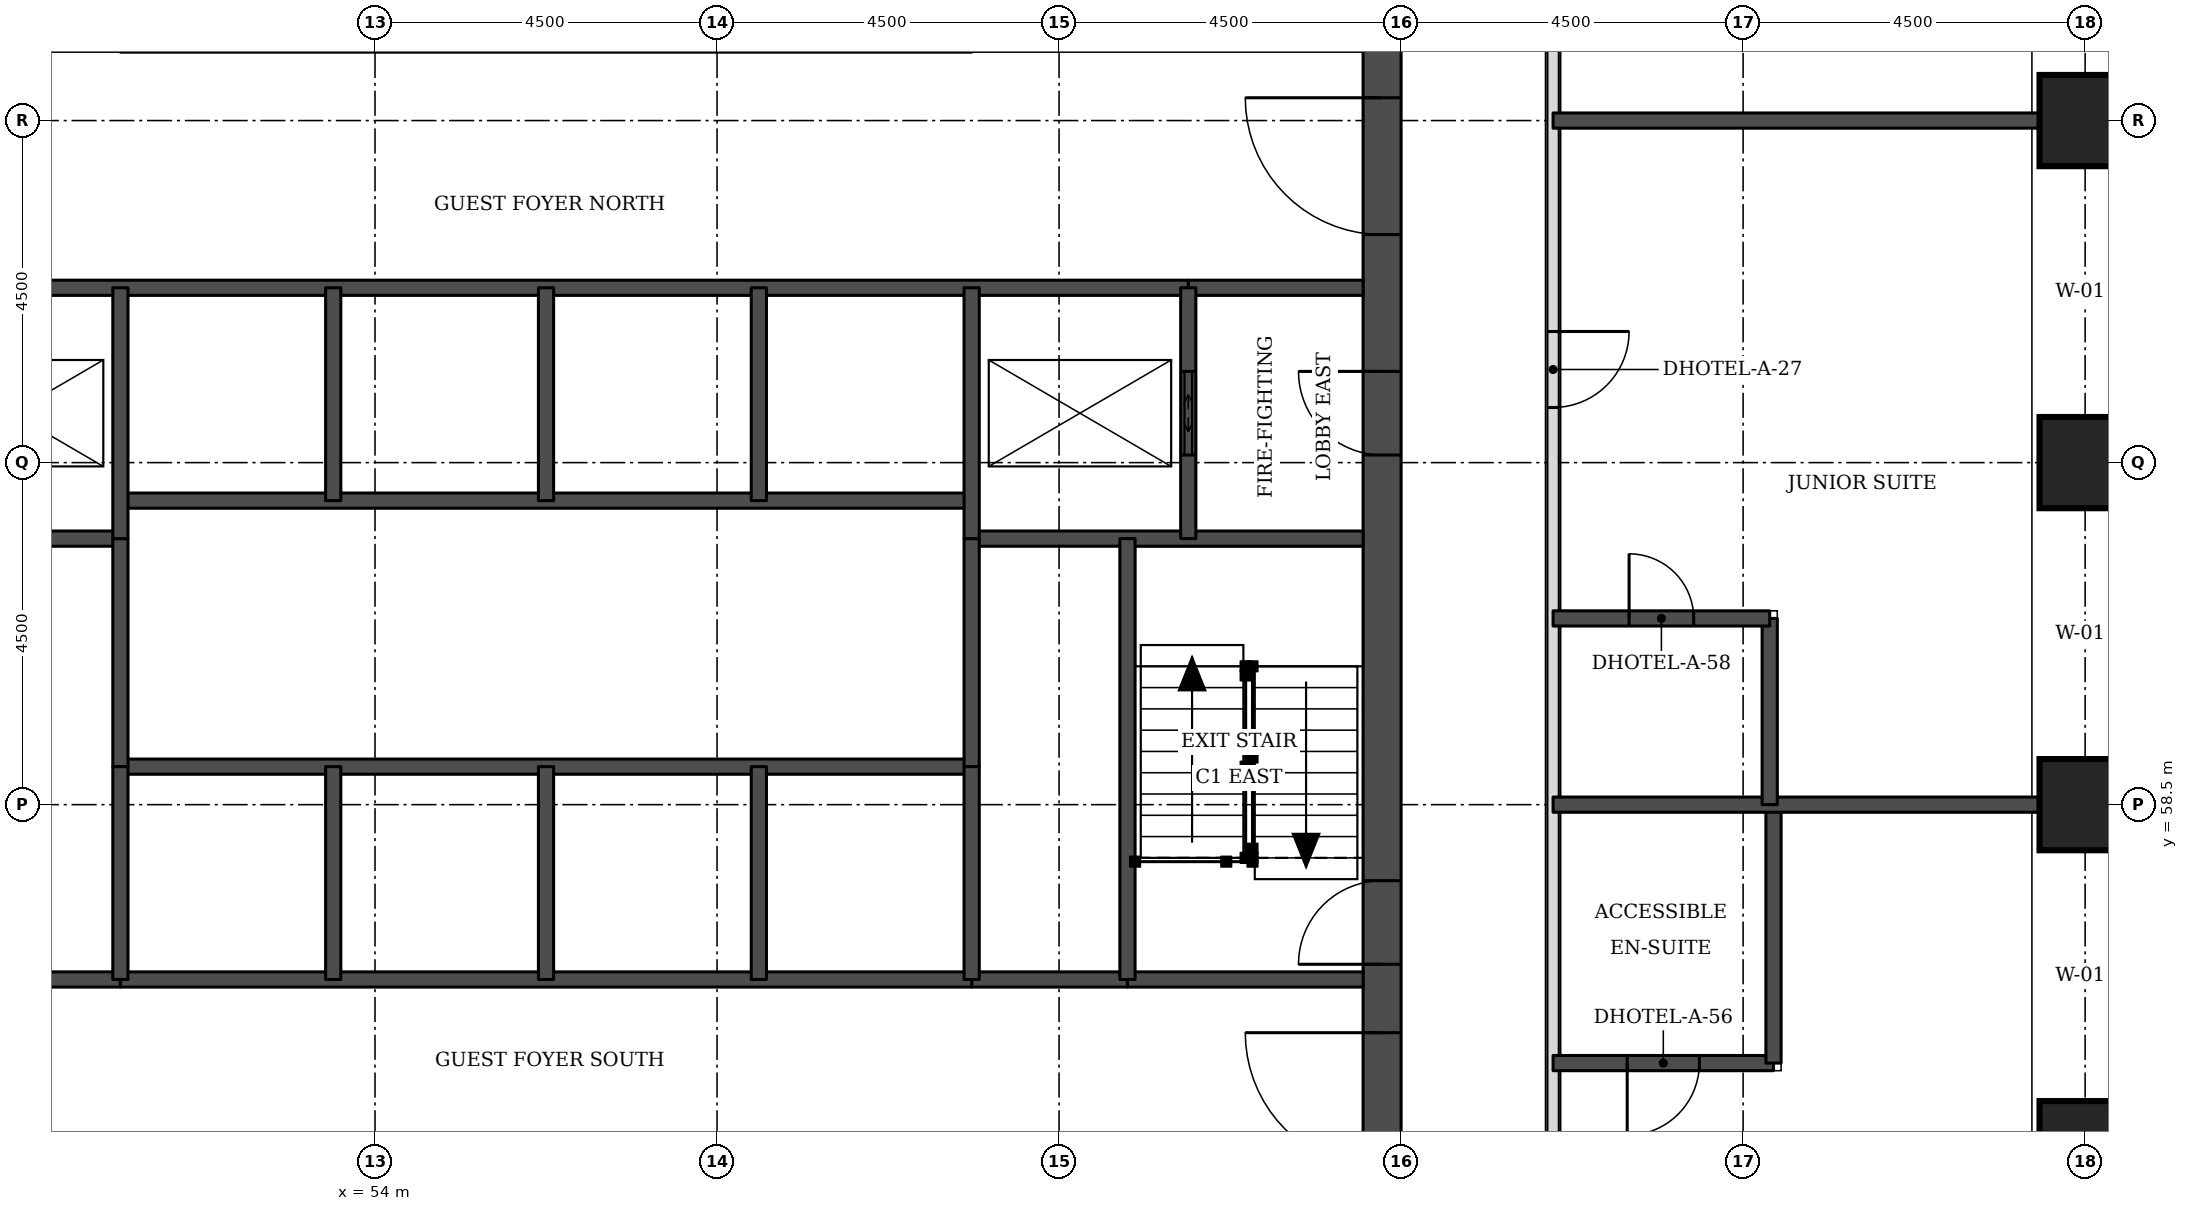
"""IFC4 building model, lengths in metres.
Left out: names, types, materials, properties, quantities, classifications, styles, units other than length and angle.
Written with IfcOpenShell. Run it as: python <this file> out.ifc"""

import sys

from ifc_helpers import new_model, si_unit, direction, frame, frame_2d, origin, origin_2d, place, context, subcontext, project, spatial, rectangle, extrude, element, fill, save


model = new_model("IFC4")
c1 = context("Model", 3, precision=1e-05, world=origin(), true_north=direction((0.0, 1.0)))
c2 = subcontext(c1, "Body", "Model", "MODEL_VIEW")
j1 = project(units=[si_unit("LENGTHUNIT", "METRE"), si_unit("PLANEANGLEUNIT", "RADIAN")], contexts=[c1])
p1 = place(None, origin())
s1 = spatial("IfcSite", under=j1, at=p1, CompositionType="ELEMENT")
p2 = place(p1, origin())
s2 = spatial("IfcBuilding", under=s1, at=p2, CompositionType="ELEMENT")
p3 = place(p2, frame((0.0, 0.0, 26.4)))
s3 = spatial("IfcBuildingStorey", under=s2, at=p3, CompositionType="ELEMENT", Elevation=26.4)
for number, where, z_axis, x_axis in (
    (1, (76.5, 54.0, 0.0), (0.0, 0.0, 1.0), (1.0, 0.0, 0.0)),
    (2, (76.5, 58.5, 0.0), (0.0, 0.0, 1.0), (1.0, 0.0, 0.0)),
    (3, (76.5, 63.0, 0.0), (0.0, 0.0, 1.0), (1.0, 0.0, 0.0)),
    (4, (76.5, 67.5, 0.0), (0.0, 0.0, 1.0), (1.0, 0.0, 0.0)),
):
    element("IfcColumn", number, at=place(p3, frame(where, z_axis=z_axis, x_axis=x_axis)), inside=s3, PredefinedType="COLUMN", context=c2, shape_type="SweptSolid", body=[
        extrude(rectangle(XDim=1.2, YDim=1.2, at=origin_2d()), origin(), (0.0, 0.0, 1.0), 3.3),
    ])
p4 = place(p3, frame((67.25, 49.5, 0.0), z_axis=(0.0, 0.0, 1.0), x_axis=(0.0, 1.0, 0.0)))
e5 = element("IfcWall", 5, at=p4, inside=s3, PredefinedType="SHEAR", context=c2, shape_type="SweptSolid", body=[
    extrude(rectangle(XDim=22.5, YDim=0.5, at=frame_2d((11.25, 0.0))), origin(), (0.0, 0.0, 1.0), 3.3),
])
p5 = place(p4, frame((4.2, 0.0, 0.0)))
e6 = element("IfcOpeningElement", 6, at=p5, cuts=e5, PredefinedType="OPENING", context=c2, shape_type="SweptSolid", body=[
    extrude(rectangle(XDim=1.8, YDim=2.1, at=frame_2d((0.9, 1.05))), frame((0.0, 0.26, 0.0), z_axis=(0.0, -1.0, 0.0), x_axis=(1.0, 0.0, 0.0)), (0.0, 0.0, 1.0), 0.52),
])
p6 = place(p4, frame((6.9, 0.0, 0.0)))
e7 = element("IfcOpeningElement", 7, at=p6, cuts=e5, PredefinedType="OPENING", context=c2, shape_type="SweptSolid", body=[
    extrude(rectangle(XDim=1.1, YDim=2.1, at=frame_2d((0.55, 1.05))), frame((0.0, 0.26, 0.0), z_axis=(0.0, -1.0, 0.0), x_axis=(1.0, 0.0, 0.0)), (0.0, 0.0, 1.0), 0.52),
])
p7 = place(p4, frame((13.6, 0.0, 0.0)))
e8 = element("IfcOpeningElement", 8, at=p7, cuts=e5, PredefinedType="OPENING", context=c2, shape_type="SweptSolid", body=[
    extrude(rectangle(XDim=1.1, YDim=2.1, at=frame_2d((0.55, 1.05))), frame((0.0, 0.26, 0.0), z_axis=(0.0, -1.0, 0.0), x_axis=(1.0, 0.0, 0.0)), (0.0, 0.0, 1.0), 0.52),
])
p8 = place(p4, frame((16.5, 0.0, 0.0)))
e9 = element("IfcOpeningElement", 9, at=p8, cuts=e5, PredefinedType="OPENING", context=c2, shape_type="SweptSolid", body=[
    extrude(rectangle(XDim=1.8, YDim=2.1, at=frame_2d((0.9, 1.05))), frame((0.0, 0.26, 0.0), z_axis=(0.0, -1.0, 0.0), x_axis=(1.0, 0.0, 0.0)), (0.0, 0.0, 1.0), 0.52),
])
p9 = place(p3, frame((69.5, 47.5, 0.0), z_axis=(0.0, 0.0, 1.0), x_axis=(0.0, 1.0, 0.0)))
e10 = element("IfcWall", 10, at=p9, inside=s3, PredefinedType="PARTITIONING", context=c2, shape_type="SweptSolid", body=[
    extrude(rectangle(XDim=26.5, YDim=0.15, at=frame_2d((13.25, 0.0))), origin(), (0.0, 0.0, 1.0), 3.08),
])
p10 = place(p9, frame((22.525, 0.0, 0.0)))
e11 = element("IfcOpeningElement", 11, at=p10, cuts=e10, PredefinedType="OPENING", context=c2, shape_type="SweptSolid", body=[
    extrude(rectangle(XDim=1.0, YDim=2.1, at=frame_2d((0.5, 1.05))), frame((0.0, 0.085, 0.0), z_axis=(0.0, -1.0, 0.0), x_axis=(1.0, 0.0, 0.0)), (0.0, 0.0, 1.0), 0.17),
])
p11 = place(p9, frame((16.225, 0.0, 0.0)))
e12 = element("IfcOpeningElement", 12, at=p11, cuts=e10, PredefinedType="OPENING", context=c2, shape_type="SweptSolid", body=[
    extrude(rectangle(XDim=1.0, YDim=2.1, at=frame_2d((0.5, 1.05))), frame((0.0, 0.085, 0.0), z_axis=(0.0, -1.0, 0.0), x_axis=(1.0, 0.0, 0.0)), (0.0, 0.0, 1.0), 0.17),
])
p12 = place(p9, frame((4.25, 0.0, 0.0)))
e13 = element("IfcOpeningElement", 13, at=p12, cuts=e10, PredefinedType="OPENING", context=c2, shape_type="SweptSolid", body=[
    extrude(rectangle(XDim=1.1, YDim=2.1, at=frame_2d((0.55, 1.05))), frame((0.0, 0.085, 0.0), z_axis=(0.0, -1.0, 0.0), x_axis=(1.0, 0.0, 0.0)), (0.0, 0.0, 1.0), 0.17),
])
p13 = place(p9, frame((0.447, 0.0, 0.0)))
e14 = element("IfcOpeningElement", 14, at=p13, cuts=e10, PredefinedType="OPENING", context=c2, shape_type="SweptSolid", body=[
    extrude(rectangle(XDim=1.0, YDim=2.1, at=frame_2d((0.5, 1.05))), frame((0.0, 0.085, 0.0), z_axis=(0.0, -1.0, 0.0), x_axis=(1.0, 0.0, 0.0)), (0.0, 0.0, 1.0), 0.17),
])
p14 = place(p3, frame((69.5, 55.1, 0.0), z_axis=(0.0, 0.0, 1.0), x_axis=(1.0, 0.0, 0.0)))
e15 = element("IfcWall", 15, at=p14, inside=s3, PredefinedType="SOLIDWALL", context=c2, shape_type="SweptSolid", body=[
    extrude(rectangle(XDim=2.9, YDim=0.2, at=frame_2d((1.45, 0.0))), origin(), (0.0, 0.0, 1.0), 3.08),
])
p15 = place(p14, frame((0.975, 0.0, 0.0)))
e16 = element("IfcOpeningElement", 16, at=p15, cuts=e15, PredefinedType="OPENING", context=c2, shape_type="SweptSolid", body=[
    extrude(rectangle(XDim=0.95, YDim=2.1, at=frame_2d((0.475, 1.05))), frame((0.0, 0.11, 0.0), z_axis=(0.0, -1.0, 0.0), x_axis=(1.0, 0.0, 0.0)), (0.0, 0.0, 1.0), 0.22),
])
p16 = place(p3, frame((72.4, 55.1, 0.0), z_axis=(0.0, 0.0, 1.0), x_axis=(0.0, 1.0, 0.0)))
e17 = element("IfcWall", 17, at=p16, inside=s3, PredefinedType="SOLIDWALL", context=c2, shape_type="SweptSolid", body=[
    extrude(rectangle(XDim=3.4, YDim=0.2, at=frame_2d((1.7, 0.0))), origin(), (0.0, 0.0, 1.0), 3.08),
])
p17 = place(p3, frame((69.5, 58.5, 0.0), z_axis=(0.0, 0.0, 1.0), x_axis=(1.0, 0.0, 0.0)))
e18 = element("IfcWall", 18, at=p17, inside=s3, PredefinedType="SOLIDWALL", context=c2, shape_type="SweptSolid", body=[
    extrude(rectangle(XDim=6.4, YDim=0.2, at=frame_2d((3.2, 0.0))), origin(), (0.0, 0.0, 1.0), 3.08),
])
p18 = place(p3, frame((72.35, 58.5, 0.0), z_axis=(0.0, 0.0, 1.0), x_axis=(0.0, 1.0, 0.0)))
e19 = element("IfcWall", 19, at=p18, inside=s3, PredefinedType="SOLIDWALL", context=c2, shape_type="SweptSolid", body=[
    extrude(rectangle(XDim=2.45, YDim=0.2, at=frame_2d((1.225, 0.0))), origin(), (0.0, 0.0, 1.0), 3.08),
])
p19 = place(p3, frame((69.5, 60.95, 0.0), z_axis=(0.0, 0.0, 1.0), x_axis=(1.0, 0.0, 0.0)))
e20 = element("IfcWall", 20, at=p19, inside=s3, PredefinedType="SOLIDWALL", context=c2, shape_type="SweptSolid", body=[
    extrude(rectangle(XDim=2.85, YDim=0.2, at=frame_2d((1.425, 0.0))), origin(), (0.0, 0.0, 1.0), 3.08),
])
p20 = place(p19, frame((1.0, 0.0, 0.0)))
e21 = element("IfcOpeningElement", 21, at=p20, cuts=e20, PredefinedType="OPENING", context=c2, shape_type="SweptSolid", body=[
    extrude(rectangle(XDim=0.85, YDim=2.1, at=frame_2d((0.425, 1.05))), frame((0.0, 0.11, 0.0), z_axis=(0.0, -1.0, 0.0), x_axis=(1.0, 0.0, 0.0)), (0.0, 0.0, 1.0), 0.22),
])
p21 = place(p3, frame((69.5, 67.5, 0.0), z_axis=(0.0, 0.0, 1.0), x_axis=(1.0, 0.0, 0.0)))
e22 = element("IfcWall", 22, at=p21, inside=s3, PredefinedType="SOLIDWALL", context=c2, shape_type="SweptSolid", body=[
    extrude(rectangle(XDim=6.4, YDim=0.2, at=frame_2d((3.2, 0.0))), origin(), (0.0, 0.0, 1.0), 3.08),
])
for number, where, z_axis, x_axis in (
    (23, (48.6, 56.2, 0.0), (0.0, 0.0, 1.0), (1.0, 0.0, 0.0)),
    (24, (61.85, 56.2, 0.0), (0.0, 0.0, 1.0), (1.0, 0.0, 0.0)),
):
    element("IfcWall", number, at=place(p3, frame(where, z_axis=z_axis, x_axis=x_axis)), inside=s3, PredefinedType="SOLIDWALL", context=c2, shape_type="SweptSolid", body=[
        extrude(rectangle(XDim=2.05, YDim=0.2, at=frame_2d((1.025, 0.0))), origin(), (0.0, 0.0, 1.0), 3.08),
    ])
p22 = place(p3, frame((50.65, 56.2, 0.0), z_axis=(0.0, 0.0, 1.0), x_axis=(1.0, 0.0, 0.0)))
e25 = element("IfcWall", 25, at=p22, inside=s3, PredefinedType="SOLIDWALL", context=c2, shape_type="SweptSolid", body=[
    extrude(rectangle(XDim=11.2, YDim=0.2, at=frame_2d((5.6, 0.0))), origin(), (0.0, 0.0, 1.0), 3.08),
])
p23 = place(p3, frame((63.9, 56.2, 0.0), z_axis=(0.0, 0.0, 1.0), x_axis=(1.0, 0.0, 0.0)))
e26 = element("IfcWall", 26, at=p23, inside=s3, PredefinedType="SOLIDWALL", context=c2, shape_type="SweptSolid", body=[
    extrude(rectangle(XDim=3.1, YDim=0.2, at=frame_2d((1.55, 0.0))), origin(), (0.0, 0.0, 1.0), 3.08),
])
p24 = place(p3, frame((50.65, 59.0, 0.0), z_axis=(0.0, 0.0, 1.0), x_axis=(1.0, 0.0, 0.0)))
e27 = element("IfcWall", 27, at=p24, inside=s3, PredefinedType="SOLIDWALL", context=c2, shape_type="SweptSolid", body=[
    extrude(rectangle(XDim=11.2, YDim=0.2, at=frame_2d((5.6, 0.0))), origin(), (0.0, 0.0, 1.0), 3.3),
])
for number, where, z_axis, x_axis in (
    (28, (45.5, 62.0, 0.0), (0.0, 0.0, 1.0), (1.0, 0.0, 0.0)),
    (29, (61.85, 62.0, 0.0), (0.0, 0.0, 1.0), (1.0, 0.0, 0.0)),
):
    element("IfcWall", number, at=place(p3, frame(where, z_axis=z_axis, x_axis=x_axis)), inside=s3, PredefinedType="SOLIDWALL", context=c2, shape_type="SweptSolid", body=[
        extrude(rectangle(XDim=5.15, YDim=0.2, at=frame_2d((2.575, 0.0))), origin(), (0.0, 0.0, 1.0), 3.08),
    ])
p25 = place(p3, frame((50.65, 62.5, 0.0), z_axis=(0.0, 0.0, 1.0), x_axis=(1.0, 0.0, 0.0)))
e30 = element("IfcWall", 30, at=p25, inside=s3, PredefinedType="SOLIDWALL", context=c2, shape_type="SweptSolid", body=[
    extrude(rectangle(XDim=11.2, YDim=0.2, at=frame_2d((5.6, 0.0))), origin(), (0.0, 0.0, 1.0), 3.3),
])
p26 = place(p3, frame((64.7, 65.3, 0.0), z_axis=(0.0, 0.0, 1.0), x_axis=(1.0, 0.0, 0.0)))
e31 = element("IfcWall", 31, at=p26, inside=s3, PredefinedType="SOLIDWALL", context=c2, shape_type="SweptSolid", body=[
    extrude(rectangle(XDim=2.3, YDim=0.2, at=frame_2d((1.15, 0.0))), origin(), (0.0, 0.0, 1.0), 3.08),
])
p27 = place(p3, frame((47.8, 65.3, 0.0), z_axis=(0.0, 0.0, 1.0), x_axis=(1.0, 0.0, 0.0)))
e32 = element("IfcWall", 32, at=p27, inside=s3, PredefinedType="SOLIDWALL", context=c2, shape_type="SweptSolid", body=[
    extrude(rectangle(XDim=16.9, YDim=0.2, at=frame_2d((8.45, 0.0))), origin(), (0.0, 0.0, 1.0), 3.08),
])
p28 = place(p3, frame((50.65, 59.0, 0.0), z_axis=(0.0, 0.0, 1.0), x_axis=(0.0, 1.0, 0.0)))
e33 = element("IfcWall", 33, at=p28, inside=s3, PredefinedType="SOLIDWALL", context=c2, shape_type="SweptSolid", body=[
    extrude(rectangle(XDim=3.0, YDim=0.2, at=frame_2d((1.5, 0.0))), origin(), (0.0, 0.0, 1.0), 3.3),
])
p29 = place(p3, frame((50.65, 56.2, 0.0), z_axis=(0.0, 0.0, 1.0), x_axis=(0.0, 1.0, 0.0)))
e34 = element("IfcWall", 34, at=p29, inside=s3, PredefinedType="SOLIDWALL", context=c2, shape_type="SweptSolid", body=[
    extrude(rectangle(XDim=2.8, YDim=0.2, at=frame_2d((1.4, 0.0))), origin(), (0.0, 0.0, 1.0), 3.08),
])
p30 = place(p3, frame((50.65, 62.0, 0.0), z_axis=(0.0, 0.0, 1.0), x_axis=(0.0, 1.0, 0.0)))
e35 = element("IfcWall", 35, at=p30, inside=s3, PredefinedType="SOLIDWALL", context=c2, shape_type="SweptSolid", body=[
    extrude(rectangle(XDim=3.3, YDim=0.2, at=frame_2d((1.65, 0.0))), origin(), (0.0, 0.0, 1.0), 3.08),
])
for number, where, z_axis, x_axis in (
    (36, (53.45, 56.2, 0.0), (0.0, 0.0, 1.0), (0.0, 1.0, 0.0)),
    (37, (53.45, 62.5, 0.0), (0.0, 0.0, 1.0), (0.0, 1.0, 0.0)),
    (38, (56.25, 56.2, 0.0), (0.0, 0.0, 1.0), (0.0, 1.0, 0.0)),
    (39, (56.25, 62.5, 0.0), (0.0, 0.0, 1.0), (0.0, 1.0, 0.0)),
    (40, (59.05, 56.2, 0.0), (0.0, 0.0, 1.0), (0.0, 1.0, 0.0)),
    (41, (59.05, 62.5, 0.0), (0.0, 0.0, 1.0), (0.0, 1.0, 0.0)),
):
    element("IfcWall", number, at=place(p3, frame(where, z_axis=z_axis, x_axis=x_axis)), inside=s3, PredefinedType="SOLIDWALL", context=c2, shape_type="SweptSolid", body=[
        extrude(rectangle(XDim=2.8, YDim=0.2, at=frame_2d((1.4, 0.0))), origin(), (0.0, 0.0, 1.0), 3.08),
    ])
p31 = place(p3, frame((61.85, 59.0, 0.0), z_axis=(0.0, 0.0, 1.0), x_axis=(0.0, 1.0, 0.0)))
e42 = element("IfcWall", 42, at=p31, inside=s3, PredefinedType="SOLIDWALL", context=c2, shape_type="SweptSolid", body=[
    extrude(rectangle(XDim=3.0, YDim=0.2, at=frame_2d((1.5, 0.0))), origin(), (0.0, 0.0, 1.0), 3.3),
])
p32 = place(p3, frame((61.85, 56.2, 0.0), z_axis=(0.0, 0.0, 1.0), x_axis=(0.0, 1.0, 0.0)))
e43 = element("IfcWall", 43, at=p32, inside=s3, PredefinedType="SOLIDWALL", context=c2, shape_type="SweptSolid", body=[
    extrude(rectangle(XDim=2.8, YDim=0.2, at=frame_2d((1.4, 0.0))), origin(), (0.0, 0.0, 1.0), 3.08),
])
p33 = place(p3, frame((61.85, 62.0, 0.0), z_axis=(0.0, 0.0, 1.0), x_axis=(0.0, 1.0, 0.0)))
e44 = element("IfcWall", 44, at=p33, inside=s3, PredefinedType="SOLIDWALL", context=c2, shape_type="SweptSolid", body=[
    extrude(rectangle(XDim=3.3, YDim=0.2, at=frame_2d((1.65, 0.0))), origin(), (0.0, 0.0, 1.0), 3.08),
])
p34 = place(p3, frame((63.9, 56.2, 0.0), z_axis=(0.0, 0.0, 1.0), x_axis=(0.0, 1.0, 0.0)))
e45 = element("IfcWall", 45, at=p34, inside=s3, PredefinedType="SOLIDWALL", context=c2, shape_type="SweptSolid", body=[
    extrude(rectangle(XDim=5.8, YDim=0.2, at=frame_2d((2.9, 0.0))), origin(), (0.0, 0.0, 1.0), 3.08),
])
p35 = place(p3, frame((64.7, 62.0, 0.0), z_axis=(0.0, 0.0, 1.0), x_axis=(0.0, 1.0, 0.0)))
e46 = element("IfcWall", 46, at=p35, inside=s3, PredefinedType="SOLIDWALL", context=c2, shape_type="SweptSolid", body=[
    extrude(rectangle(XDim=3.3, YDim=0.2, at=frame_2d((1.65, 0.0))), origin(), (0.0, 0.0, 1.0), 3.08),
])
p36 = place(p35, frame((1.1, 0.0, 0.0)))
e47 = element("IfcOpeningElement", 47, at=p36, cuts=e46, PredefinedType="OPENING", context=c2, shape_type="SweptSolid", body=[
    extrude(rectangle(XDim=1.1, YDim=2.1, at=frame_2d((0.55, 1.05))), frame((0.0, 0.11, 0.0), z_axis=(0.0, -1.0, 0.0), x_axis=(1.0, 0.0, 0.0)), (0.0, 0.0, 1.0), 0.22),
])
p37 = place(p11, frame((1.0, 0.0, 0.0), z_axis=(0.0, 0.0, 1.0), x_axis=(-1.0, 0.0, 0.0)))
e48 = element("IfcDoor", 48, at=p37, inside=s3, OperationType="SINGLE_SWING_LEFT", PredefinedType="DOOR", context=c2, shape_type="SweptSolid", body=[
    extrude(rectangle(XDim=1.0, YDim=2.1, at=frame_2d((0.5, 1.05))), frame((0.0, 0.025, 0.0), z_axis=(0.0, -1.0, 0.0), x_axis=(1.0, 0.0, 0.0)), (0.0, 0.0, 1.0), 0.05),
])
fill(e12, e48)
p38 = place(p20, origin())
e49 = element("IfcDoor", 49, at=p38, inside=s3, OperationType="SINGLE_SWING_LEFT", PredefinedType="DOOR", context=c2, shape_type="SweptSolid", body=[
    extrude(rectangle(XDim=0.85, YDim=2.1, at=frame_2d((0.425, 1.05))), frame((0.0, 0.025, 0.0), z_axis=(0.0, -1.0, 0.0), x_axis=(1.0, 0.0, 0.0)), (0.0, 0.0, 1.0), 0.05),
])
fill(e21, e49)
p39 = place(p15, frame((0.95, 0.0, 0.0), z_axis=(0.0, 0.0, 1.0), x_axis=(-1.0, 0.0, 0.0)))
e50 = element("IfcDoor", 50, at=p39, inside=s3, OperationType="SINGLE_SWING_RIGHT", PredefinedType="DOOR", context=c2, shape_type="SweptSolid", body=[
    extrude(rectangle(XDim=0.95, YDim=2.1, at=frame_2d((0.475, 1.05))), frame((0.0, 0.025, 0.0), z_axis=(0.0, -1.0, 0.0), x_axis=(1.0, 0.0, 0.0)), (0.0, 0.0, 1.0), 0.05),
])
fill(e16, e50)
p40 = place(p36, origin())
e51 = element("IfcDoor", 51, at=p40, inside=s3, OperationType="DOUBLE_DOOR_SLIDING", PredefinedType="DOOR", context=c2, shape_type="SweptSolid", body=[
    extrude(rectangle(XDim=1.1, YDim=2.1, at=frame_2d((0.55, 1.05))), frame((0.0, 0.025, 0.0), z_axis=(0.0, -1.0, 0.0), x_axis=(1.0, 0.0, 0.0)), (0.0, 0.0, 1.0), 0.05),
])
fill(e47, e51)
p41 = place(p5, origin())
e52 = element("IfcDoor", 52, at=p41, inside=s3, OperationType="SINGLE_SWING_RIGHT", PredefinedType="DOOR", context=c2, shape_type="SweptSolid", body=[
    extrude(rectangle(XDim=1.8, YDim=2.1, at=frame_2d((0.9, 1.05))), frame((0.0, 0.025, 0.0), z_axis=(0.0, -1.0, 0.0), x_axis=(1.0, 0.0, 0.0)), (0.0, 0.0, 1.0), 0.05),
])
fill(e6, e52)
p42 = place(p6, origin())
e53 = element("IfcDoor", 53, at=p42, inside=s3, OperationType="SINGLE_SWING_LEFT", PredefinedType="DOOR", context=c2, shape_type="SweptSolid", body=[
    extrude(rectangle(XDim=1.1, YDim=2.1, at=frame_2d((0.55, 1.05))), frame((0.0, 0.025, 0.0), z_axis=(0.0, -1.0, 0.0), x_axis=(1.0, 0.0, 0.0)), (0.0, 0.0, 1.0), 0.05),
])
fill(e7, e53)
p43 = place(p7, origin())
e54 = element("IfcDoor", 54, at=p43, inside=s3, OperationType="SINGLE_SWING_RIGHT", PredefinedType="DOOR", context=c2, shape_type="SweptSolid", body=[
    extrude(rectangle(XDim=1.1, YDim=2.1, at=frame_2d((0.55, 1.05))), frame((0.0, 0.025, 0.0), z_axis=(0.0, -1.0, 0.0), x_axis=(1.0, 0.0, 0.0)), (0.0, 0.0, 1.0), 0.05),
])
fill(e8, e54)
p44 = place(p8, origin())
e55 = element("IfcDoor", 55, at=p44, inside=s3, OperationType="SINGLE_SWING_RIGHT", PredefinedType="DOOR", context=c2, shape_type="SweptSolid", body=[
    extrude(rectangle(XDim=1.8, YDim=2.1, at=frame_2d((0.9, 1.05))), frame((0.0, 0.025, 0.0), z_axis=(0.0, -1.0, 0.0), x_axis=(1.0, 0.0, 0.0)), (0.0, 0.0, 1.0), 0.05),
])
fill(e9, e55)
save(model, sys.argv[1])
